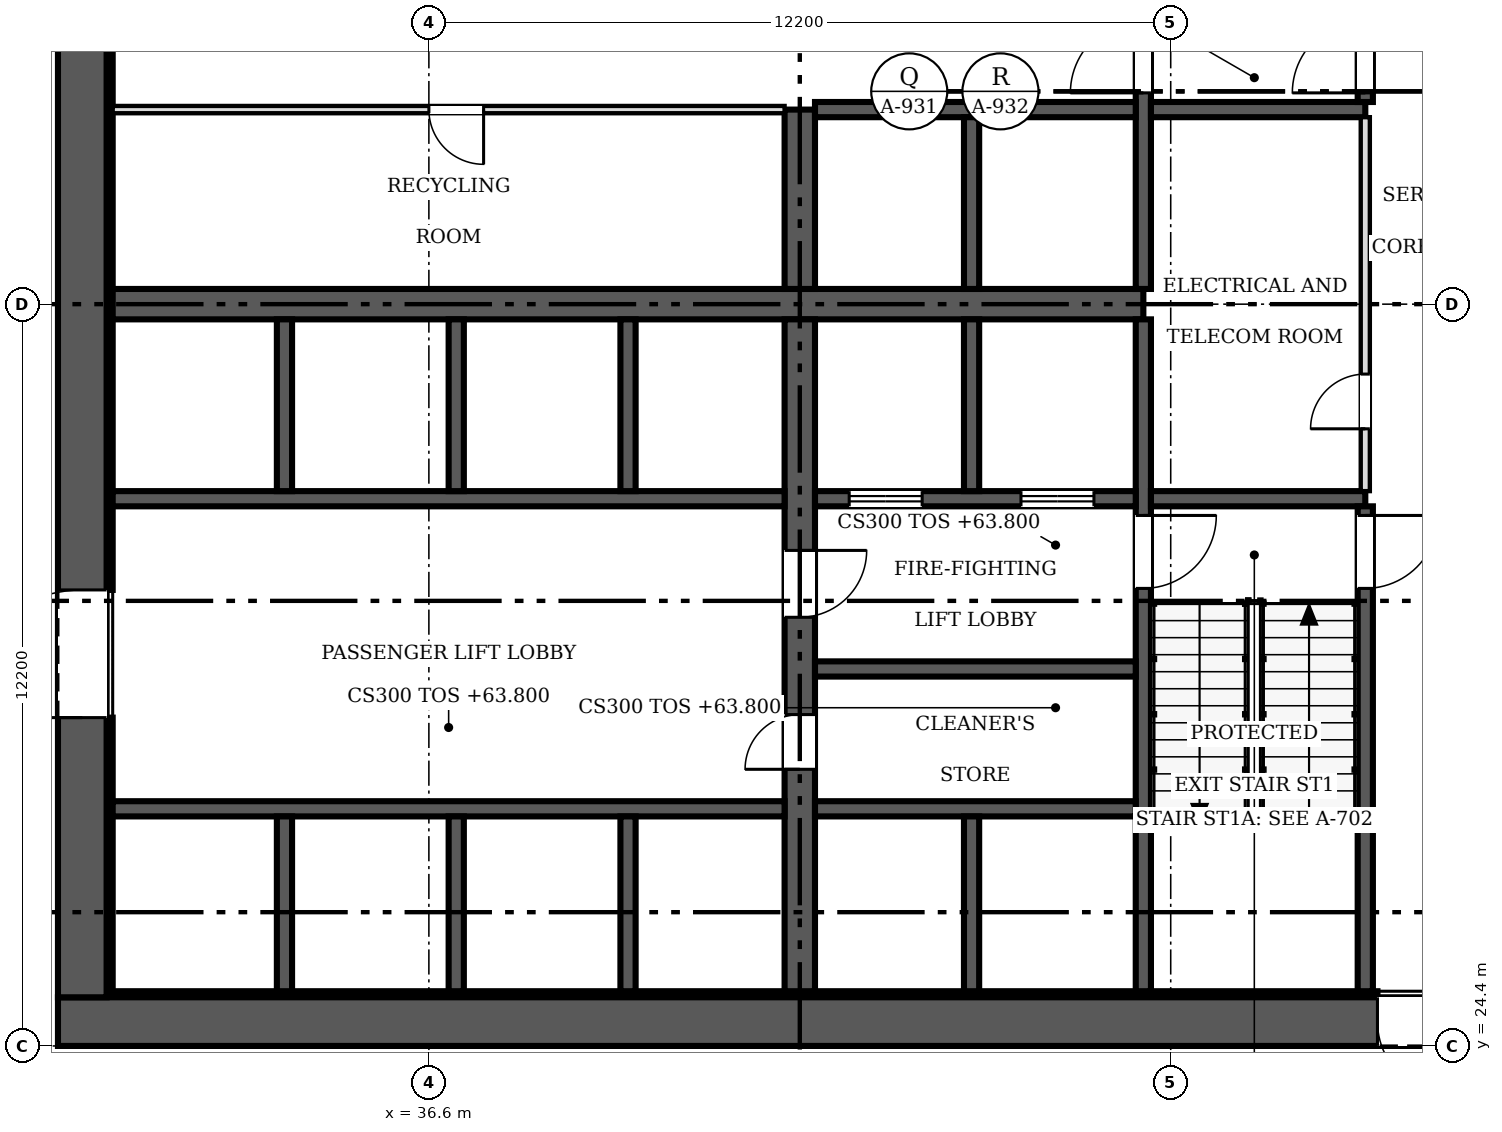
"""IFC4 building model, lengths in metres.
Left out: names, types, materials, properties, quantities, classifications, styles, units other than length and angle.
Written with IfcOpenShell. Run it as: python <this file> out.ifc"""

import sys

from ifc_helpers import new_model, si_unit, direction, frame, frame_2d, origin, place, context, subcontext, project, spatial, rectangle, extrude, source, transform, mapped, element, fill, save


model = new_model("IFC4")
c1 = context("Model", 3, precision=1e-05, world=origin(), true_north=direction((0.0, 1.0)))
c2 = subcontext(c1, "Body", "Model", "MODEL_VIEW")
j1 = project(units=[si_unit("LENGTHUNIT", "METRE"), si_unit("PLANEANGLEUNIT", "RADIAN")], contexts=[c1])
p1 = place(None, origin())
s1 = spatial("IfcSite", under=j1, at=p1, CompositionType="ELEMENT")
p2 = place(p1, origin())
s2 = spatial("IfcBuilding", under=s1, at=p2, CompositionType="ELEMENT")
p3 = place(p2, frame((0.0, 0.0, 63.8)))
s3 = spatial("IfcBuildingStorey", under=s2, at=p3, CompositionType="ELEMENT", Elevation=63.8)
p4 = place(p3, frame((54.9, 24.8, 0.0), z_axis=(0.0, 0.0, 1.0), x_axis=(-1.0, 0.0, 0.0)))
e1 = element("IfcWall", 1, at=p4, inside=s3, PredefinedType="SHEAR", context=c2, shape_type="SweptSolid", body=[
    extrude(rectangle(XDim=24.4, YDim=0.8, at=frame_2d((12.2, 0.0))), origin(), (0.0, 0.0, 1.0), 4.8),
])
m1 = source(origin(), c2, "Body", "SweptSolid", [
    extrude(rectangle(XDim=1.2, YDim=2.1, at=frame_2d((0.6, 1.05))), frame((0.0, 0.41, 0.0), z_axis=(0.0, -1.0, 0.0), x_axis=(1.0, 0.0, 0.0)), (0.0, 0.0, 1.0), 0.82),
])
p5 = place(p4, frame((1.5, 0.0, 0.0)))
e2 = element("IfcOpeningElement", 2, at=p5, cuts=e1, PredefinedType="OPENING", context=c2, shape_type="MappedRepresentation", body=[
    mapped(m1, transform((0.0, 0.0, 0.0), scale=1.0)),
])
p6 = place(p3, frame((30.9, 25.2, 0.0), z_axis=(0.0, 0.0, 1.0), x_axis=(0.0, 1.0, 0.0)))
e3 = element("IfcWall", 3, at=p6, inside=s3, PredefinedType="SHEAR", context=c2, shape_type="SweptSolid", body=[
    extrude(rectangle(XDim=22.8, YDim=0.8, at=frame_2d((11.4, 0.0))), origin(), (0.0, 0.0, 1.0), 4.8),
])
m2 = source(origin(), c2, "Body", "SweptSolid", [
    extrude(rectangle(XDim=2.1, YDim=2.4, at=frame_2d((1.05, 1.2))), frame((0.0, 0.41, 0.0), z_axis=(0.0, -1.0, 0.0), x_axis=(1.0, 0.0, 0.0)), (0.0, 0.0, 1.0), 0.82),
])
p7 = place(p6, frame((4.6, 0.0, 0.0)))
e4 = element("IfcOpeningElement", 4, at=p7, cuts=e3, PredefinedType="OPENING", context=c2, shape_type="MappedRepresentation", body=[
    mapped(m2, transform((0.0, 0.0, 0.0), scale=1.0)),
])
p8 = place(p6, frame((16.1, 0.0, 0.0)))
e5 = element("IfcOpeningElement", 5, at=p8, cuts=e3, PredefinedType="OPENING", context=c2, shape_type="MappedRepresentation", body=[
    mapped(m2, transform((0.0, 0.0, 0.0), scale=1.0)),
])
p9 = place(p3, frame((31.3, 25.25, 0.0), z_axis=(0.0, 0.0, 1.0), x_axis=(1.0, 0.0, 0.0)))
e6 = element("IfcWall", 6, at=p9, inside=s3, PredefinedType="SOLIDWALL", context=c2, shape_type="SweptSolid", body=[
    extrude(rectangle(XDim=20.9, YDim=0.1, at=frame_2d((10.45, 0.0))), origin(), (0.0, 0.0, 1.0), 4.8),
])
p10 = place(p3, frame((31.35, 25.3, 0.0), z_axis=(0.0, 0.0, 1.0), x_axis=(0.0, 1.0, 0.0)))
e7 = element("IfcWall", 7, at=p10, inside=s3, PredefinedType="SOLIDWALL", context=c2, shape_type="SweptSolid", body=[
    extrude(rectangle(XDim=4.5, YDim=0.1, at=frame_2d((2.25, 0.0))), origin(), (0.0, 0.0, 1.0), 4.8),
])
p11 = place(p3, frame((31.35, 31.9, 0.0), z_axis=(0.0, 0.0, 1.0), x_axis=(0.0, 1.0, 0.0)))
e8 = element("IfcWall", 8, at=p11, inside=s3, PredefinedType="SOLIDWALL", context=c2, shape_type="SweptSolid", body=[
    extrude(rectangle(XDim=9.4, YDim=0.1, at=frame_2d((4.7, 0.0))), origin(), (0.0, 0.0, 1.0), 4.8),
])
p12 = place(p3, frame((31.4, 36.6, 0.0), z_axis=(0.0, 0.0, 1.0), x_axis=(1.0, 0.0, 0.0)))
e9 = element("IfcWall", 9, at=p12, inside=s3, PredefinedType="SHEAR", context=c2, shape_type="SweptSolid", body=[
    extrude(rectangle(XDim=16.95, YDim=0.5, at=frame_2d((8.475, 0.0))), origin(), (0.0, 0.0, 1.0), 4.8),
])
p13 = place(p3, frame((42.7, 36.35, 0.0), z_axis=(0.0, 0.0, 1.0), x_axis=(0.0, -1.0, 0.0)))
e10 = element("IfcWall", 10, at=p13, inside=s3, PredefinedType="SHEAR", context=c2, shape_type="SweptSolid", body=[
    extrude(rectangle(XDim=11.05, YDim=0.5, at=frame_2d((5.525, 0.0))), origin(), (0.0, 0.0, 1.0), 4.8),
])
m3 = source(origin(), c2, "Body", "SweptSolid", [
    extrude(rectangle(XDim=0.9, YDim=2.1, at=frame_2d((0.45, 1.05))), frame((0.0, 0.26, 0.0), z_axis=(0.0, -1.0, 0.0), x_axis=(1.0, 0.0, 0.0)), (0.0, 0.0, 1.0), 0.52),
])
p14 = place(p13, frame((6.5, 0.0, 0.0)))
e11 = element("IfcOpeningElement", 11, at=p14, cuts=e10, PredefinedType="OPENING", context=c2, shape_type="MappedRepresentation", body=[
    mapped(m3, transform((0.0, 0.0, 0.0), scale=1.0)),
])
m4 = source(origin(), c2, "Body", "SweptSolid", [
    extrude(rectangle(XDim=1.1, YDim=2.1, at=frame_2d((0.55, 1.05))), frame((0.0, 0.26, 0.0), z_axis=(0.0, -1.0, 0.0), x_axis=(1.0, 0.0, 0.0)), (0.0, 0.0, 1.0), 0.52),
])
p15 = place(p13, frame((3.8, 0.0, 0.0)))
e12 = element("IfcOpeningElement", 12, at=p15, cuts=e10, PredefinedType="OPENING", context=c2, shape_type="MappedRepresentation", body=[
    mapped(m4, transform((0.0, 0.0, 0.0), scale=1.0)),
])
p16 = place(p3, frame((42.7, 36.85, 0.0), z_axis=(0.0, 0.0, 1.0), x_axis=(0.0, 1.0, 0.0)))
e13 = element("IfcWall", 13, at=p16, inside=s3, PredefinedType="SHEAR", context=c2, shape_type="SweptSolid", body=[
    extrude(rectangle(XDim=2.95, YDim=0.5, at=frame_2d((1.475, 0.0))), origin(), (0.0, 0.0, 1.0), 4.8),
])
p17 = place(p3, frame((48.35, 36.35, 0.0), z_axis=(0.0, 0.0, 1.0), x_axis=(0.0, -1.0, 0.0)))
e14 = element("IfcWall", 14, at=p17, inside=s3, PredefinedType="SOLIDWALL", context=c2, shape_type="SweptSolid", body=[
    extrude(rectangle(XDim=11.05, YDim=0.25, at=frame_2d((5.525, 0.0))), origin(), (0.0, 0.0, 1.0), 4.8),
])
m5 = source(origin(), c2, "Body", "SweptSolid", [
    extrude(rectangle(XDim=1.2, YDim=2.1, at=frame_2d((0.6, 1.05))), frame((0.0, 0.135, 0.0), z_axis=(0.0, -1.0, 0.0), x_axis=(1.0, 0.0, 0.0)), (0.0, 0.0, 1.0), 0.27),
])
p18 = place(p17, frame((3.225, 0.0, 0.0)))
e15 = element("IfcOpeningElement", 15, at=p18, cuts=e14, PredefinedType="OPENING", context=c2, shape_type="MappedRepresentation", body=[
    mapped(m5, transform((0.0, 0.0, 0.0), scale=1.0)),
])
p19 = place(p3, frame((48.35, 47.9, 0.0), z_axis=(0.0, 0.0, 1.0), x_axis=(0.0, -1.0, 0.0)))
e16 = element("IfcWall", 16, at=p19, inside=s3, PredefinedType="SOLIDWALL", context=c2, shape_type="SweptSolid", body=[
    extrude(rectangle(XDim=11.05, YDim=0.25, at=frame_2d((5.525, 0.0))), origin(), (0.0, 0.0, 1.0), 4.8),
])
p20 = place(p19, frame((6.625, 0.0, 0.0)))
e17 = element("IfcOpeningElement", 17, at=p20, cuts=e16, PredefinedType="OPENING", context=c2, shape_type="MappedRepresentation", body=[
    mapped(m5, transform((0.0, 0.0, 0.0), scale=1.0)),
])
p21 = place(p3, frame((31.4, 33.4, 0.0), z_axis=(0.0, 0.0, 1.0), x_axis=(1.0, 0.0, 0.0)))
e18 = element("IfcWall", 18, at=p21, inside=s3, PredefinedType="SOLIDWALL", context=c2, shape_type="SweptSolid", body=[
    extrude(rectangle(XDim=11.05, YDim=0.25, at=frame_2d((5.525, 0.0))), origin(), (0.0, 0.0, 1.0), 4.8),
])
p22 = place(p3, frame((48.225, 33.4, 0.0), z_axis=(0.0, 0.0, 1.0), x_axis=(-1.0, 0.0, 0.0)))
e19 = element("IfcWall", 19, at=p22, inside=s3, PredefinedType="SOLIDWALL", context=c2, shape_type="SweptSolid", body=[
    extrude(rectangle(XDim=5.275, YDim=0.25, at=frame_2d((2.638, 0.0))), origin(), (0.0, 0.0, 1.0), 4.8),
])
p23 = place(p22, frame((3.512, 0.0, 0.0)))
e20 = element("IfcOpeningElement", 20, at=p23, cuts=e19, PredefinedType="OPENING", context=c2, shape_type="MappedRepresentation", body=[
    mapped(m5, transform((0.0, 0.0, 0.0), scale=1.0)),
])
p24 = place(p22, frame((0.688, 0.0, 0.0)))
e21 = element("IfcOpeningElement", 21, at=p24, cuts=e19, PredefinedType="OPENING", context=c2, shape_type="MappedRepresentation", body=[
    mapped(m5, transform((0.0, 0.0, 0.0), scale=1.0)),
])
p25 = place(p3, frame((48.475, 33.4, 0.0), z_axis=(0.0, 0.0, 1.0), x_axis=(1.0, 0.0, 0.0)))
e22 = element("IfcWall", 22, at=p25, inside=s3, PredefinedType="SOLIDWALL", context=c2, shape_type="SweptSolid", body=[
    extrude(rectangle(XDim=3.525, YDim=0.25, at=frame_2d((1.762, 0.0))), origin(), (0.0, 0.0, 1.0), 4.8),
])
p26 = place(p3, frame((31.4, 28.3, 0.0), z_axis=(0.0, 0.0, 1.0), x_axis=(1.0, 0.0, 0.0)))
e23 = element("IfcWall", 23, at=p26, inside=s3, PredefinedType="SOLIDWALL", context=c2, shape_type="SweptSolid", body=[
    extrude(rectangle(XDim=11.05, YDim=0.25, at=frame_2d((5.525, 0.0))), origin(), (0.0, 0.0, 1.0), 4.8),
])
for number, where, z_axis, x_axis in (
    (24, (42.95, 28.3, 0.0), (0.0, 0.0, 1.0), (1.0, 0.0, 0.0)),
    (25, (42.95, 39.8, 0.0), (0.0, 0.0, 1.0), (1.0, 0.0, 0.0)),
):
    element("IfcWall", number, at=place(p3, frame(where, z_axis=z_axis, x_axis=x_axis)), inside=s3, PredefinedType="SOLIDWALL", context=c2, shape_type="SweptSolid", body=[
        extrude(rectangle(XDim=5.275, YDim=0.25, at=frame_2d((2.638, 0.0))), origin(), (0.0, 0.0, 1.0), 4.8),
    ])
p27 = place(p3, frame((48.475, 39.8, 0.0), z_axis=(0.0, 0.0, 1.0), x_axis=(1.0, 0.0, 0.0)))
e26 = element("IfcWall", 26, at=p27, inside=s3, PredefinedType="SOLIDWALL", context=c2, shape_type="SweptSolid", body=[
    extrude(rectangle(XDim=3.525, YDim=0.25, at=frame_2d((1.762, 0.0))), origin(), (0.0, 0.0, 1.0), 4.8),
])
p28 = place(p3, frame((52.0, 25.3, 0.0), z_axis=(0.0, 0.0, 1.0), x_axis=(0.0, 1.0, 0.0)))
e27 = element("IfcWall", 27, at=p28, inside=s3, PredefinedType="SOLIDWALL", context=c2, shape_type="SweptSolid", body=[
    extrude(rectangle(XDim=7.975, YDim=0.25, at=frame_2d((3.987, 0.0))), origin(), (0.0, 0.0, 1.0), 4.8),
])
p29 = place(p28, frame((6.625, 0.0, 0.0)))
e28 = element("IfcOpeningElement", 28, at=p29, cuts=e27, PredefinedType="OPENING", context=c2, shape_type="MappedRepresentation", body=[
    mapped(m5, transform((0.0, 0.0, 0.0), scale=1.0)),
])
p30 = place(p3, frame((52.0, 39.925, 0.0), z_axis=(0.0, 0.0, 1.0), x_axis=(0.0, 1.0, 0.0)))
e29 = element("IfcWall", 29, at=p30, inside=s3, PredefinedType="SOLIDWALL", context=c2, shape_type="SweptSolid", body=[
    extrude(rectangle(XDim=7.975, YDim=0.25, at=frame_2d((3.987, 0.0))), origin(), (0.0, 0.0, 1.0), 4.8),
])
p31 = place(p30, frame((0.15, 0.0, 0.0)))
e30 = element("IfcOpeningElement", 30, at=p31, cuts=e29, PredefinedType="OPENING", context=c2, shape_type="MappedRepresentation", body=[
    mapped(m5, transform((0.0, 0.0, 0.0), scale=1.0)),
])
p32 = place(p3, frame((45.525, 33.525, 0.0), z_axis=(0.0, 0.0, 1.0), x_axis=(0.0, 1.0, 0.0)))
e31 = element("IfcWall", 31, at=p32, inside=s3, PredefinedType="SOLIDWALL", context=c2, shape_type="SweptSolid", body=[
    extrude(rectangle(XDim=2.825, YDim=0.25, at=frame_2d((1.413, 0.0))), origin(), (0.0, 0.0, 1.0), 4.8),
])
p33 = place(p3, frame((45.525, 36.85, 0.0), z_axis=(0.0, 0.0, 1.0), x_axis=(0.0, 1.0, 0.0)))
e32 = element("IfcWall", 32, at=p33, inside=s3, PredefinedType="SOLIDWALL", context=c2, shape_type="SweptSolid", body=[
    extrude(rectangle(XDim=2.825, YDim=0.25, at=frame_2d((1.413, 0.0))), origin(), (0.0, 0.0, 1.0), 4.8),
])
p34 = place(p3, frame((42.95, 30.6, 0.0), z_axis=(0.0, 0.0, 1.0), x_axis=(1.0, 0.0, 0.0)))
e33 = element("IfcWall", 33, at=p34, inside=s3, PredefinedType="SOLIDWALL", context=c2, shape_type="SweptSolid", body=[
    extrude(rectangle(XDim=5.275, YDim=0.25, at=frame_2d((2.638, 0.0))), origin(), (0.0, 0.0, 1.0), 4.8),
])
for number, where, z_axis, x_axis in (
    (34, (34.225, 33.525, 0.0), (0.0, 0.0, 1.0), (0.0, 1.0, 0.0)),
    (35, (37.05, 33.525, 0.0), (0.0, 0.0, 1.0), (0.0, 1.0, 0.0)),
    (36, (39.875, 33.525, 0.0), (0.0, 0.0, 1.0), (0.0, 1.0, 0.0)),
):
    element("IfcWall", number, at=place(p3, frame(where, z_axis=z_axis, x_axis=x_axis)), inside=s3, PredefinedType="SOLIDWALL", context=c2, shape_type="SweptSolid", body=[
        extrude(rectangle(XDim=2.825, YDim=0.25, at=frame_2d((1.413, 0.0))), origin(), (0.0, 0.0, 1.0), 4.8),
    ])
for number, where, z_axis, x_axis in (
    (37, (34.225, 25.3, 0.0), (0.0, 0.0, 1.0), (0.0, 1.0, 0.0)),
    (38, (37.05, 25.3, 0.0), (0.0, 0.0, 1.0), (0.0, 1.0, 0.0)),
    (39, (39.875, 25.3, 0.0), (0.0, 0.0, 1.0), (0.0, 1.0, 0.0)),
    (40, (45.525, 25.3, 0.0), (0.0, 0.0, 1.0), (0.0, 1.0, 0.0)),
):
    element("IfcWall", number, at=place(p3, frame(where, z_axis=z_axis, x_axis=x_axis)), inside=s3, PredefinedType="SOLIDWALL", context=c2, shape_type="SweptSolid", body=[
        extrude(rectangle(XDim=2.875, YDim=0.25, at=frame_2d((1.438, 0.0))), origin(), (0.0, 0.0, 1.0), 4.8),
    ])
p35 = place(p3, frame((42.45, 39.8, 0.0), z_axis=(0.0, 0.0, 1.0), x_axis=(-1.0, 0.0, 0.0)))
e41 = element("IfcWall", 41, at=p35, inside=s3, PredefinedType="PARTITIONING", context=c2, shape_type="SweptSolid", body=[
    extrude(rectangle(XDim=11.05, YDim=0.12, at=frame_2d((5.525, 0.0))), origin(), (0.0, 0.0, 1.0), 4.6),
])
m6 = source(origin(), c2, "Body", "SweptSolid", [
    extrude(rectangle(XDim=0.9, YDim=2.1, at=frame_2d((0.45, 1.05))), frame((0.0, 0.07, 0.0), z_axis=(0.0, -1.0, 0.0), x_axis=(1.0, 0.0, 0.0)), (0.0, 0.0, 1.0), 0.14),
])
p36 = place(p35, frame((4.95, 0.0, 0.0)))
e42 = element("IfcOpeningElement", 42, at=p36, cuts=e41, PredefinedType="OPENING", context=c2, shape_type="MappedRepresentation", body=[
    mapped(m6, transform((0.0, 0.0, 0.0), scale=1.0)),
])
p37 = place(p3, frame((52.0, 33.525, 0.0), z_axis=(0.0, 0.0, 1.0), x_axis=(0.0, 1.0, 0.0)))
e43 = element("IfcWall", 43, at=p37, inside=s3, PredefinedType="PARTITIONING", context=c2, shape_type="SweptSolid", body=[
    extrude(rectangle(XDim=6.15, YDim=0.15, at=frame_2d((3.075, 0.0))), origin(), (0.0, 0.0, 1.0), 4.6),
])
m7 = source(origin(), c2, "Body", "SweptSolid", [
    extrude(rectangle(XDim=0.9, YDim=2.1, at=frame_2d((0.45, 1.05))), frame((0.0, 0.085, 0.0), z_axis=(0.0, -1.0, 0.0), x_axis=(1.0, 0.0, 0.0)), (0.0, 0.0, 1.0), 0.17),
])
p38 = place(p37, frame((1.025, 0.0, 0.0)))
e44 = element("IfcOpeningElement", 44, at=p38, cuts=e43, PredefinedType="OPENING", context=c2, shape_type="MappedRepresentation", body=[
    mapped(m7, transform((0.0, 0.0, 0.0), scale=1.0)),
])
m8 = source(origin(), c2, "Body", "SweptSolid", [
    extrude(rectangle(XDim=1.2, YDim=2.1, at=frame_2d((0.6, 1.05))), frame((0.0, 0.025, 0.0), z_axis=(0.0, -1.0, 0.0), x_axis=(1.0, 0.0, 0.0)), (0.0, 0.0, 1.0), 0.05),
])
p39 = place(p5, origin())
e45 = element("IfcDoor", 45, at=p39, inside=s3, OperationType="SINGLE_SWING_LEFT", PredefinedType="DOOR", context=c2, shape_type="MappedRepresentation", body=[
    mapped(m8, transform((0.0, 0.0, 0.0), scale=1.0)),
])
fill(e2, e45)
m9 = source(origin(), c2, "Body", "SweptSolid", [
    extrude(rectangle(XDim=2.1, YDim=2.4, at=frame_2d((1.05, 1.2))), frame((0.0, 0.025, 0.0), z_axis=(0.0, -1.0, 0.0), x_axis=(1.0, 0.0, 0.0)), (0.0, 0.0, 1.0), 0.05),
])
p40 = place(p7, origin())
e46 = element("IfcDoor", 46, at=p40, inside=s3, OperationType="DOUBLE_DOOR_SINGLE_SWING", PredefinedType="DOOR", context=c2, shape_type="MappedRepresentation", body=[
    mapped(m9, transform((0.0, 0.0, 0.0), scale=1.0)),
])
fill(e4, e46)
m10 = source(origin(), c2, "Body", "SweptSolid", [
    extrude(rectangle(XDim=0.9, YDim=2.1, at=frame_2d((0.45, 1.05))), frame((0.0, 0.025, 0.0), z_axis=(0.0, -1.0, 0.0), x_axis=(1.0, 0.0, 0.0)), (0.0, 0.0, 1.0), 0.05),
])
p41 = place(p14, origin())
e47 = element("IfcDoor", 47, at=p41, inside=s3, OperationType="SINGLE_SWING_RIGHT", PredefinedType="DOOR", context=c2, shape_type="MappedRepresentation", body=[
    mapped(m10, transform((0.0, 0.0, 0.0), scale=1.0)),
])
fill(e11, e47)
m11 = source(origin(), c2, "Body", "SweptSolid", [
    extrude(rectangle(XDim=1.1, YDim=2.1, at=frame_2d((0.55, 1.05))), frame((0.0, 0.025, 0.0), z_axis=(0.0, -1.0, 0.0), x_axis=(1.0, 0.0, 0.0)), (0.0, 0.0, 1.0), 0.05),
])
p42 = place(p15, origin())
e48 = element("IfcDoor", 48, at=p42, inside=s3, OperationType="SINGLE_SWING_LEFT", PredefinedType="DOOR", context=c2, shape_type="MappedRepresentation", body=[
    mapped(m11, transform((0.0, 0.0, 0.0), scale=1.0)),
])
fill(e12, e48)
p43 = place(p18, origin())
e49 = element("IfcDoor", 49, at=p43, inside=s3, OperationType="SINGLE_SWING_LEFT", PredefinedType="DOOR", context=c2, shape_type="MappedRepresentation", body=[
    mapped(m8, transform((0.0, 0.0, 0.0), scale=1.0)),
])
fill(e15, e49)
p44 = place(p20, origin())
e50 = element("IfcDoor", 50, at=p44, inside=s3, OperationType="SINGLE_SWING_RIGHT", PredefinedType="DOOR", context=c2, shape_type="MappedRepresentation", body=[
    mapped(m8, transform((0.0, 0.0, 0.0), scale=1.0)),
])
fill(e17, e50)
p45 = place(p23, origin())
e51 = element("IfcDoor", 51, at=p45, inside=s3, OperationType="DOUBLE_DOOR_SLIDING", PredefinedType="DOOR", context=c2, shape_type="MappedRepresentation", body=[
    mapped(m8, transform((0.0, 0.0, 0.0), scale=1.0)),
])
fill(e20, e51)
p46 = place(p24, origin())
e52 = element("IfcDoor", 52, at=p46, inside=s3, OperationType="DOUBLE_DOOR_SLIDING", PredefinedType="DOOR", context=c2, shape_type="MappedRepresentation", body=[
    mapped(m8, transform((0.0, 0.0, 0.0), scale=1.0)),
])
fill(e21, e52)
p47 = place(p29, origin())
e53 = element("IfcDoor", 53, at=p47, inside=s3, OperationType="SINGLE_SWING_RIGHT", PredefinedType="DOOR", context=c2, shape_type="MappedRepresentation", body=[
    mapped(m8, transform((0.0, 0.0, 0.0), scale=1.0)),
])
fill(e28, e53)
p48 = place(p31, origin())
e54 = element("IfcDoor", 54, at=p48, inside=s3, OperationType="SINGLE_SWING_LEFT", PredefinedType="DOOR", context=c2, shape_type="MappedRepresentation", body=[
    mapped(m8, transform((0.0, 0.0, 0.0), scale=1.0)),
])
fill(e30, e54)
p49 = place(p36, origin())
e55 = element("IfcDoor", 55, at=p49, inside=s3, OperationType="SINGLE_SWING_LEFT", PredefinedType="DOOR", context=c2, shape_type="MappedRepresentation", body=[
    mapped(m10, transform((0.0, 0.0, 0.0), scale=1.0)),
])
fill(e42, e55)
p50 = place(p38, origin())
e56 = element("IfcDoor", 56, at=p50, inside=s3, OperationType="SINGLE_SWING_LEFT", PredefinedType="DOOR", context=c2, shape_type="MappedRepresentation", body=[
    mapped(m10, transform((0.0, 0.0, 0.0), scale=1.0)),
])
fill(e44, e56)
save(model, sys.argv[1])
